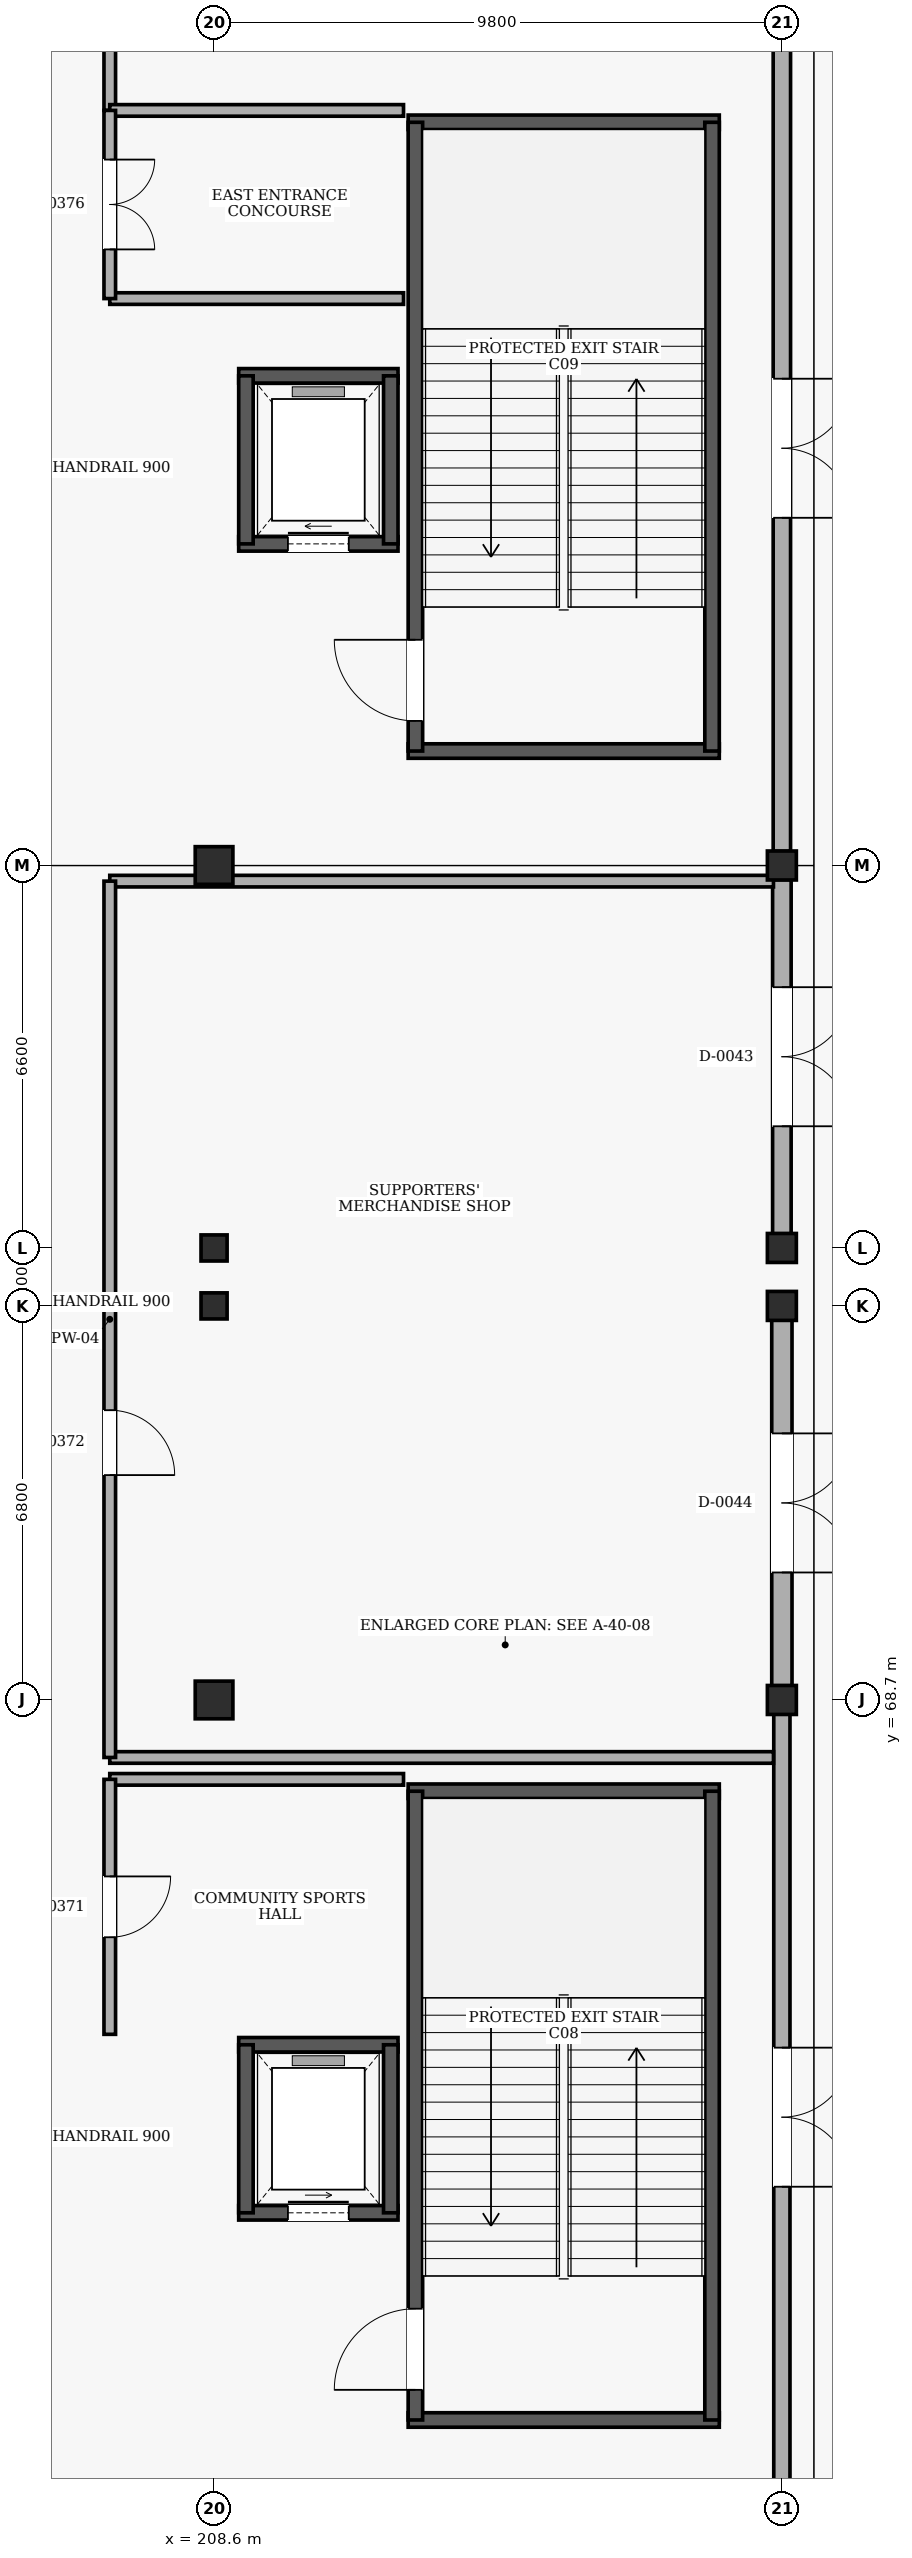
"""IFC4 building model, lengths in metres.
Left out: names, types, materials, properties, quantities, classifications, styles, units other than length and angle.
Written with IfcOpenShell. Run it as: python <this file> out.ifc"""

import sys

from ifc_helpers import new_model, si_unit, direction, frame, frame_2d, origin, origin_2d, place, context, subcontext, project, spatial, rectangle, extrude, element, fill, save


model = new_model("IFC4")
c1 = context("Model", 3, precision=1e-05, world=origin(), true_north=direction((0.0, 1.0)))
c2 = subcontext(c1, "Body", "Model", "MODEL_VIEW")
j1 = project(units=[si_unit("LENGTHUNIT", "METRE"), si_unit("PLANEANGLEUNIT", "RADIAN")], contexts=[c1])
p1 = place(None, origin())
s1 = spatial("IfcSite", under=j1, at=p1, CompositionType="ELEMENT")
p2 = place(p1, origin())
s2 = spatial("IfcBuilding", under=s1, at=p2, CompositionType="ELEMENT")
p3 = place(p2, origin())
s3 = spatial("IfcBuildingStorey", under=s2, at=p3, CompositionType="ELEMENT", Elevation=0.0)
p4 = place(p3, frame((208.6, 68.7, 0.0), z_axis=(0.0, 0.0, 1.0), x_axis=(1.0, 0.0, 0.0)))
e1 = element("IfcColumn", 1, at=p4, inside=s3, PredefinedType="COLUMN", context=c2, shape_type="SweptSolid", body=[
    extrude(rectangle(XDim=0.65, YDim=0.65, at=origin_2d()), origin(), (0.0, 0.0, 1.0), 5.4),
])
for number, where, z_axis, x_axis in (
    (2, (208.6, 75.5, 0.0), (0.0, 0.0, 1.0), (1.0, 0.0, 0.0)),
    (3, (208.6, 76.5, 0.0), (0.0, 0.0, 1.0), (1.0, 0.0, 0.0)),
):
    element("IfcColumn", number, at=place(p3, frame(where, z_axis=z_axis, x_axis=x_axis)), inside=s3, PredefinedType="COLUMN", context=c2, shape_type="SweptSolid", body=[
        extrude(rectangle(XDim=0.45, YDim=0.45, at=origin_2d()), origin(), (0.0, 0.0, 1.0), 5.4),
    ])
p5 = place(p3, frame((208.6, 83.1, 0.0), z_axis=(0.0, 0.0, 1.0), x_axis=(1.0, 0.0, 0.0)))
e4 = element("IfcColumn", 4, at=p5, inside=s3, PredefinedType="COLUMN", context=c2, shape_type="SweptSolid", body=[
    extrude(rectangle(XDim=0.65, YDim=0.65, at=origin_2d()), origin(), (0.0, 0.0, 1.0), 5.4),
])
for number, where, z_axis, x_axis in (
    (5, (218.4, 68.7, 0.0), (0.0, 0.0, 1.0), (1.0, 0.0, 0.0)),
    (6, (218.4, 75.5, 0.0), (0.0, 0.0, 1.0), (1.0, 0.0, 0.0)),
    (7, (218.4, 76.5, 0.0), (0.0, 0.0, 1.0), (1.0, 0.0, 0.0)),
    (8, (218.4, 83.1, 0.0), (0.0, 0.0, 1.0), (1.0, 0.0, 0.0)),
):
    element("IfcColumn", number, at=place(p3, frame(where, z_axis=z_axis, x_axis=x_axis)), inside=s3, PredefinedType="COLUMN", context=c2, shape_type="SweptSolid", body=[
        extrude(rectangle(XDim=0.5, YDim=0.5, at=origin_2d()), origin(), (0.0, 0.0, 1.0), 5.4),
    ])
p6 = place(p3, frame((218.4, 97.255, 0.0), z_axis=(0.0, 0.0, 1.0), x_axis=(0.0, -1.0, 0.0)))
e9 = element("IfcWall", 9, at=p6, inside=s3, PredefinedType="SOLIDWALL", context=c2, shape_type="SweptSolid", body=[
    extrude(rectangle(XDim=13.91, YDim=0.3, at=frame_2d((6.955, 0.0))), origin(), (0.0, 0.0, 1.0), 4.16),
])
p7 = place(p6, frame((5.755, 0.0, 0.0)))
e10 = element("IfcOpeningElement", 10, at=p7, cuts=e9, PredefinedType="OPENING", context=c2, shape_type="SweptSolid", body=[
    extrude(rectangle(XDim=2.4, YDim=2.2, at=frame_2d((1.2, 1.1))), frame((0.0, 0.16, 0.0), z_axis=(0.0, -1.0, 0.0), x_axis=(1.0, 0.0, 0.0)), (0.0, 0.0, 1.0), 0.32),
])
p8 = place(p3, frame((218.4, 82.855, 0.0), z_axis=(0.0, 0.0, 1.0), x_axis=(0.0, -1.0, 0.0)))
e11 = element("IfcWall", 11, at=p8, inside=s3, PredefinedType="SOLIDWALL", context=c2, shape_type="SweptSolid", body=[
    extrude(rectangle(XDim=6.11, YDim=0.32, at=frame_2d((3.055, 0.0))), origin(), (0.0, 0.0, 1.0), 4.56),
])
p9 = place(p8, frame((1.855, 0.0, 0.0)))
e12 = element("IfcOpeningElement", 12, at=p9, cuts=e11, PredefinedType="OPENING", context=c2, shape_type="SweptSolid", body=[
    extrude(rectangle(XDim=2.4, YDim=2.2, at=frame_2d((1.2, 1.1))), frame((0.0, 0.17, 0.0), z_axis=(0.0, -1.0, 0.0), x_axis=(1.0, 0.0, 0.0)), (0.0, 0.0, 1.0), 0.34),
])
p10 = place(p3, frame((218.4, 75.255, 0.0), z_axis=(0.0, 0.0, 1.0), x_axis=(0.0, -1.0, 0.0)))
e13 = element("IfcWall", 13, at=p10, inside=s3, PredefinedType="SOLIDWALL", context=c2, shape_type="SweptSolid", body=[
    extrude(rectangle(XDim=6.31, YDim=0.35, at=frame_2d((3.155, 0.0))), origin(), (0.0, 0.0, 1.0), 4.46),
])
p11 = place(p10, frame((1.955, 0.0, 0.0)))
e14 = element("IfcOpeningElement", 14, at=p11, cuts=e13, PredefinedType="OPENING", context=c2, shape_type="SweptSolid", body=[
    extrude(rectangle(XDim=2.4, YDim=2.2, at=frame_2d((1.2, 1.1))), frame((0.0, 0.185, 0.0), z_axis=(0.0, -1.0, 0.0), x_axis=(1.0, 0.0, 0.0)), (0.0, 0.0, 1.0), 0.37),
])
p12 = place(p3, frame((218.4, 68.455, 0.0), z_axis=(0.0, 0.0, 1.0), x_axis=(0.0, -1.0, 0.0)))
e15 = element("IfcWall", 15, at=p12, inside=s3, PredefinedType="SOLIDWALL", context=c2, shape_type="SweptSolid", body=[
    extrude(rectangle(XDim=13.91, YDim=0.28, at=frame_2d((6.955, 0.0))), origin(), (0.0, 0.0, 1.0), 4.16),
])
p13 = place(p12, frame((5.755, 0.0, 0.0)))
e16 = element("IfcOpeningElement", 16, at=p13, cuts=e15, PredefinedType="OPENING", context=c2, shape_type="SweptSolid", body=[
    extrude(rectangle(XDim=2.4, YDim=2.2, at=frame_2d((1.2, 1.1))), frame((0.0, 0.15, 0.0), z_axis=(0.0, -1.0, 0.0), x_axis=(1.0, 0.0, 0.0)), (0.0, 0.0, 1.0), 0.3),
])
for number, where, z_axis, x_axis in (
    (17, (211.95, 56.275, 0.0), (0.0, 0.0, 1.0), (1.0, 0.0, 0.0)),
    (18, (217.32, 67.125, 0.0), (0.0, 0.0, 1.0), (-1.0, 0.0, 0.0)),
):
    element("IfcWall", number, at=place(p3, frame(where, z_axis=z_axis, x_axis=x_axis)), inside=s3, PredefinedType="SHEAR", context=c2, shape_type="SweptSolid", body=[
        extrude(rectangle(XDim=5.37, YDim=0.25, at=frame_2d((2.685, 0.0))), origin(), (0.0, 0.0, 1.0), 5.08),
    ])
p14 = place(p3, frame((212.075, 56.275, 0.0), z_axis=(0.0, 0.0, 1.0), x_axis=(0.0, 1.0, 0.0)))
e19 = element("IfcWall", 19, at=p14, inside=s3, PredefinedType="SHEAR", context=c2, shape_type="SweptSolid", body=[
    extrude(rectangle(XDim=10.85, YDim=0.25, at=frame_2d((5.425, 0.0))), origin(), (0.0, 0.0, 1.0), 5.08),
])
p15 = place(p14, frame((0.52, 0.0, 0.0)))
e20 = element("IfcOpeningElement", 20, at=p15, cuts=e19, PredefinedType="OPENING", context=c2, shape_type="SweptSolid", body=[
    extrude(rectangle(XDim=1.4, YDim=2.15, at=frame_2d((0.7, 1.075))), frame((0.0, 0.135, 0.0), z_axis=(0.0, -1.0, 0.0), x_axis=(1.0, 0.0, 0.0)), (0.0, 0.0, 1.0), 0.27),
])
p16 = place(p3, frame((217.195, 56.275, 0.0), z_axis=(0.0, 0.0, 1.0), x_axis=(0.0, 1.0, 0.0)))
e21 = element("IfcWall", 21, at=p16, inside=s3, PredefinedType="SHEAR", context=c2, shape_type="SweptSolid", body=[
    extrude(rectangle(XDim=10.85, YDim=0.25, at=frame_2d((5.425, 0.0))), origin(), (0.0, 0.0, 1.0), 5.08),
])
for number, where, z_axis, x_axis in (
    (22, (211.95, 85.075, 0.0), (0.0, 0.0, 1.0), (1.0, 0.0, 0.0)),
    (23, (217.32, 95.925, 0.0), (0.0, 0.0, 1.0), (-1.0, 0.0, 0.0)),
):
    element("IfcWall", number, at=place(p3, frame(where, z_axis=z_axis, x_axis=x_axis)), inside=s3, PredefinedType="SHEAR", context=c2, shape_type="SweptSolid", body=[
        extrude(rectangle(XDim=5.37, YDim=0.25, at=frame_2d((2.685, 0.0))), origin(), (0.0, 0.0, 1.0), 5.08),
    ])
p17 = place(p3, frame((212.075, 85.075, 0.0), z_axis=(0.0, 0.0, 1.0), x_axis=(0.0, 1.0, 0.0)))
e24 = element("IfcWall", 24, at=p17, inside=s3, PredefinedType="SHEAR", context=c2, shape_type="SweptSolid", body=[
    extrude(rectangle(XDim=10.85, YDim=0.25, at=frame_2d((5.425, 0.0))), origin(), (0.0, 0.0, 1.0), 5.08),
])
p18 = place(p17, frame((0.52, 0.0, 0.0)))
e25 = element("IfcOpeningElement", 25, at=p18, cuts=e24, PredefinedType="OPENING", context=c2, shape_type="SweptSolid", body=[
    extrude(rectangle(XDim=1.4, YDim=2.15, at=frame_2d((0.7, 1.075))), frame((0.0, 0.135, 0.0), z_axis=(0.0, -1.0, 0.0), x_axis=(1.0, 0.0, 0.0)), (0.0, 0.0, 1.0), 0.27),
])
p19 = place(p3, frame((217.195, 85.075, 0.0), z_axis=(0.0, 0.0, 1.0), x_axis=(0.0, 1.0, 0.0)))
e26 = element("IfcWall", 26, at=p19, inside=s3, PredefinedType="SHEAR", context=c2, shape_type="SweptSolid", body=[
    extrude(rectangle(XDim=10.85, YDim=0.25, at=frame_2d((5.425, 0.0))), origin(), (0.0, 0.0, 1.0), 5.08),
])
p20 = place(p3, frame((209.025, 59.85, 0.0), z_axis=(0.0, 0.0, 1.0), x_axis=(1.0, 0.0, 0.0)))
e27 = element("IfcWall", 27, at=p20, inside=s3, PredefinedType="SHEAR", context=c2, shape_type="SweptSolid", body=[
    extrude(rectangle(XDim=2.75, YDim=0.25, at=frame_2d((1.375, 0.0))), origin(), (0.0, 0.0, 1.0), 5.08),
])
p21 = place(p20, frame((0.85, 0.0, 0.0)))
e28 = element("IfcOpeningElement", 28, at=p21, cuts=e27, PredefinedType="OPENING", context=c2, shape_type="SweptSolid", body=[
    extrude(rectangle(XDim=1.05, YDim=2.15, at=frame_2d((0.525, 1.075))), frame((0.0, 0.135, 0.0), z_axis=(0.0, -1.0, 0.0), x_axis=(1.0, 0.0, 0.0)), (0.0, 0.0, 1.0), 0.27),
])
p22 = place(p3, frame((211.775, 62.75, 0.0), z_axis=(0.0, 0.0, 1.0), x_axis=(-1.0, 0.0, 0.0)))
e29 = element("IfcWall", 29, at=p22, inside=s3, PredefinedType="SHEAR", context=c2, shape_type="SweptSolid", body=[
    extrude(rectangle(XDim=2.75, YDim=0.25, at=frame_2d((1.375, 0.0))), origin(), (0.0, 0.0, 1.0), 5.08),
])
for number, where, z_axis, x_axis in (
    (30, (209.15, 62.75, 0.0), (0.0, 0.0, 1.0), (0.0, -1.0, 0.0)),
    (31, (211.65, 59.85, 0.0), (0.0, 0.0, 1.0), (0.0, 1.0, 0.0)),
):
    element("IfcWall", number, at=place(p3, frame(where, z_axis=z_axis, x_axis=x_axis)), inside=s3, PredefinedType="SHEAR", context=c2, shape_type="SweptSolid", body=[
        extrude(rectangle(XDim=2.9, YDim=0.25, at=frame_2d((1.45, 0.0))), origin(), (0.0, 0.0, 1.0), 5.08),
    ])
p23 = place(p3, frame((209.025, 88.65, 0.0), z_axis=(0.0, 0.0, 1.0), x_axis=(1.0, 0.0, 0.0)))
e32 = element("IfcWall", 32, at=p23, inside=s3, PredefinedType="SHEAR", context=c2, shape_type="SweptSolid", body=[
    extrude(rectangle(XDim=2.75, YDim=0.25, at=frame_2d((1.375, 0.0))), origin(), (0.0, 0.0, 1.0), 5.08),
])
p24 = place(p23, frame((0.85, 0.0, 0.0)))
e33 = element("IfcOpeningElement", 33, at=p24, cuts=e32, PredefinedType="OPENING", context=c2, shape_type="SweptSolid", body=[
    extrude(rectangle(XDim=1.05, YDim=2.15, at=frame_2d((0.525, 1.075))), frame((0.0, 0.135, 0.0), z_axis=(0.0, -1.0, 0.0), x_axis=(1.0, 0.0, 0.0)), (0.0, 0.0, 1.0), 0.27),
])
p25 = place(p3, frame((211.775, 91.55, 0.0), z_axis=(0.0, 0.0, 1.0), x_axis=(-1.0, 0.0, 0.0)))
e34 = element("IfcWall", 34, at=p25, inside=s3, PredefinedType="SHEAR", context=c2, shape_type="SweptSolid", body=[
    extrude(rectangle(XDim=2.75, YDim=0.25, at=frame_2d((1.375, 0.0))), origin(), (0.0, 0.0, 1.0), 5.08),
])
for number, where, z_axis, x_axis in (
    (35, (209.15, 91.55, 0.0), (0.0, 0.0, 1.0), (0.0, -1.0, 0.0)),
    (36, (211.65, 88.65, 0.0), (0.0, 0.0, 1.0), (0.0, 1.0, 0.0)),
):
    element("IfcWall", number, at=place(p3, frame(where, z_axis=z_axis, x_axis=x_axis)), inside=s3, PredefinedType="SHEAR", context=c2, shape_type="SweptSolid", body=[
        extrude(rectangle(XDim=2.9, YDim=0.25, at=frame_2d((1.45, 0.0))), origin(), (0.0, 0.0, 1.0), 5.08),
    ])
p26 = place(p3, frame((211.87, 67.33, 0.0), z_axis=(0.0, 0.0, 1.0), x_axis=(-1.0, 0.0, 0.0)))
e37 = element("IfcWall", 37, at=p26, inside=s3, PredefinedType="PARTITIONING", context=c2, shape_type="SweptSolid", body=[
    extrude(rectangle(XDim=5.07, YDim=0.2, at=frame_2d((2.535, 0.0))), origin(), (0.0, 0.0, 1.0), 5.08),
])
p27 = place(p3, frame((206.8, 67.33, 0.0), z_axis=(0.0, 0.0, 1.0), x_axis=(0.0, -1.0, 0.0)))
e38 = element("IfcWall", 38, at=p27, inside=s3, PredefinedType="PARTITIONING", context=c2, shape_type="SweptSolid", body=[
    extrude(rectangle(XDim=4.4, YDim=0.2, at=frame_2d((2.2, 0.0))), origin(), (0.0, 0.0, 1.0), 5.08),
])
p28 = place(p27, frame((1.675, 0.0, 0.0)))
e39 = element("IfcOpeningElement", 39, at=p28, cuts=e38, PredefinedType="OPENING", context=c2, shape_type="SweptSolid", body=[
    extrude(rectangle(XDim=1.05, YDim=2.15, at=frame_2d((0.525, 1.075))), frame((0.0, 0.11, 0.0), z_axis=(0.0, -1.0, 0.0), x_axis=(1.0, 0.0, 0.0)), (0.0, 0.0, 1.0), 0.22),
])
p29 = place(p3, frame((206.8, 67.708, 0.0), z_axis=(0.0, 0.0, 1.0), x_axis=(1.0, 0.0, 0.0)))
e40 = element("IfcWall", 40, at=p29, inside=s3, PredefinedType="PARTITIONING", context=c2, shape_type="SweptSolid", body=[
    extrude(rectangle(XDim=11.455, YDim=0.2, at=frame_2d((5.728, 0.0))), origin(), (0.0, 0.0, 1.0), 5.08),
])
p30 = place(p3, frame((218.255, 82.83, 0.0), z_axis=(0.0, 0.0, 1.0), x_axis=(-1.0, 0.0, 0.0)))
e41 = element("IfcWall", 41, at=p30, inside=s3, PredefinedType="PARTITIONING", context=c2, shape_type="SweptSolid", body=[
    extrude(rectangle(XDim=11.455, YDim=0.2, at=frame_2d((5.728, 0.0))), origin(), (0.0, 0.0, 1.0), 4.21),
])
p31 = place(p3, frame((206.8, 82.83, 0.0), z_axis=(0.0, 0.0, 1.0), x_axis=(0.0, -1.0, 0.0)))
e42 = element("IfcWall", 42, at=p31, inside=s3, PredefinedType="PARTITIONING", context=c2, shape_type="SweptSolid", body=[
    extrude(rectangle(XDim=15.123, YDim=0.2, at=frame_2d((7.561, 0.0))), origin(), (0.0, 0.0, 1.0), 5.08),
])
p32 = place(p31, frame((9.13, 0.0, 0.0)))
e43 = element("IfcOpeningElement", 43, at=p32, cuts=e42, PredefinedType="OPENING", context=c2, shape_type="SweptSolid", body=[
    extrude(rectangle(XDim=1.12, YDim=2.15, at=frame_2d((0.56, 1.075))), frame((0.0, 0.11, 0.0), z_axis=(0.0, -1.0, 0.0), x_axis=(1.0, 0.0, 0.0)), (0.0, 0.0, 1.0), 0.22),
])
p33 = place(p3, frame((206.8, 101.817, 0.0), z_axis=(0.0, 0.0, 1.0), x_axis=(0.0, -1.0, 0.0)))
e44 = element("IfcWall", 44, at=p33, inside=s3, PredefinedType="PARTITIONING", context=c2, shape_type="SweptSolid", body=[
    extrude(rectangle(XDim=5.687, YDim=0.2, at=frame_2d((2.843, 0.0))), origin(), (0.0, 0.0, 1.0), 5.08),
])
p34 = place(p33, frame((2.143, 0.0, 0.0)))
e45 = element("IfcOpeningElement", 45, at=p34, cuts=e44, PredefinedType="OPENING", context=c2, shape_type="SweptSolid", body=[
    extrude(rectangle(XDim=1.4, YDim=2.2, at=frame_2d((0.7, 1.1))), frame((0.0, 0.11, 0.0), z_axis=(0.0, -1.0, 0.0), x_axis=(1.0, 0.0, 0.0)), (0.0, 0.0, 1.0), 0.22),
])
for number, where, z_axis, x_axis in (
    (46, (206.8, 92.883, 0.0), (0.0, 0.0, 1.0), (1.0, 0.0, 0.0)),
    (47, (211.87, 96.13, 0.0), (0.0, 0.0, 1.0), (-1.0, 0.0, 0.0)),
):
    element("IfcWall", number, at=place(p3, frame(where, z_axis=z_axis, x_axis=x_axis)), inside=s3, PredefinedType="PARTITIONING", context=c2, shape_type="SweptSolid", body=[
        extrude(rectangle(XDim=5.07, YDim=0.2, at=frame_2d((2.535, 0.0))), origin(), (0.0, 0.0, 1.0), 5.08),
    ])
p35 = place(p3, frame((206.8, 96.13, 0.0), z_axis=(0.0, 0.0, 1.0), x_axis=(0.0, -1.0, 0.0)))
e48 = element("IfcWall", 48, at=p35, inside=s3, PredefinedType="PARTITIONING", context=c2, shape_type="SweptSolid", body=[
    extrude(rectangle(XDim=3.247, YDim=0.2, at=frame_2d((1.623, 0.0))), origin(), (0.0, 0.0, 1.0), 5.08),
])
p36 = place(p35, frame((0.848, 0.0, 0.0)))
e49 = element("IfcOpeningElement", 49, at=p36, cuts=e48, PredefinedType="OPENING", context=c2, shape_type="SweptSolid", body=[
    extrude(rectangle(XDim=1.55, YDim=2.2, at=frame_2d((0.775, 1.1))), frame((0.0, 0.11, 0.0), z_axis=(0.0, -1.0, 0.0), x_axis=(1.0, 0.0, 0.0)), (0.0, 0.0, 1.0), 0.22),
])
p37 = place(p7, origin())
e50 = element("IfcDoor", 50, at=p37, inside=s3, OperationType="DOUBLE_DOOR_SINGLE_SWING", PredefinedType="DOOR", context=c2, shape_type="SweptSolid", body=[
    extrude(rectangle(XDim=2.4, YDim=2.2, at=frame_2d((1.2, 1.1))), frame((0.0, 0.025, 0.0), z_axis=(0.0, -1.0, 0.0), x_axis=(1.0, 0.0, 0.0)), (0.0, 0.0, 1.0), 0.05),
])
fill(e10, e50)
p38 = place(p9, origin())
e51 = element("IfcDoor", 51, at=p38, inside=s3, OperationType="DOUBLE_DOOR_SINGLE_SWING", PredefinedType="DOOR", context=c2, shape_type="SweptSolid", body=[
    extrude(rectangle(XDim=2.4, YDim=2.2, at=frame_2d((1.2, 1.1))), frame((0.0, 0.025, 0.0), z_axis=(0.0, -1.0, 0.0), x_axis=(1.0, 0.0, 0.0)), (0.0, 0.0, 1.0), 0.05),
])
fill(e12, e51)
p39 = place(p11, origin())
e52 = element("IfcDoor", 52, at=p39, inside=s3, OperationType="DOUBLE_DOOR_SINGLE_SWING", PredefinedType="DOOR", context=c2, shape_type="SweptSolid", body=[
    extrude(rectangle(XDim=2.4, YDim=2.2, at=frame_2d((1.2, 1.1))), frame((0.0, 0.025, 0.0), z_axis=(0.0, -1.0, 0.0), x_axis=(1.0, 0.0, 0.0)), (0.0, 0.0, 1.0), 0.05),
])
fill(e14, e52)
p40 = place(p13, origin())
e53 = element("IfcDoor", 53, at=p40, inside=s3, OperationType="DOUBLE_DOOR_SINGLE_SWING", PredefinedType="DOOR", context=c2, shape_type="SweptSolid", body=[
    extrude(rectangle(XDim=2.4, YDim=2.2, at=frame_2d((1.2, 1.1))), frame((0.0, 0.025, 0.0), z_axis=(0.0, -1.0, 0.0), x_axis=(1.0, 0.0, 0.0)), (0.0, 0.0, 1.0), 0.05),
])
fill(e16, e53)
p41 = place(p15, origin())
e54 = element("IfcDoor", 54, at=p41, inside=s3, OperationType="SINGLE_SWING_LEFT", PredefinedType="DOOR", context=c2, shape_type="SweptSolid", body=[
    extrude(rectangle(XDim=1.4, YDim=2.15, at=frame_2d((0.7, 1.075))), frame((0.0, 0.025, 0.0), z_axis=(0.0, -1.0, 0.0), x_axis=(1.0, 0.0, 0.0)), (0.0, 0.0, 1.0), 0.05),
])
fill(e20, e54)
p42 = place(p18, origin())
e55 = element("IfcDoor", 55, at=p42, inside=s3, OperationType="SINGLE_SWING_RIGHT", PredefinedType="DOOR", context=c2, shape_type="SweptSolid", body=[
    extrude(rectangle(XDim=1.4, YDim=2.15, at=frame_2d((0.7, 1.075))), frame((0.0, 0.025, 0.0), z_axis=(0.0, -1.0, 0.0), x_axis=(1.0, 0.0, 0.0)), (0.0, 0.0, 1.0), 0.05),
])
fill(e25, e55)
p43 = place(p21, origin())
e56 = element("IfcDoor", 56, at=p43, inside=s3, OperationType="SLIDING_TO_LEFT", PredefinedType="DOOR", context=c2, shape_type="SweptSolid", body=[
    extrude(rectangle(XDim=1.05, YDim=2.15, at=frame_2d((0.525, 1.075))), frame((0.0, 0.025, 0.0), z_axis=(0.0, -1.0, 0.0), x_axis=(1.0, 0.0, 0.0)), (0.0, 0.0, 1.0), 0.05),
])
fill(e28, e56)
p44 = place(p24, origin())
e57 = element("IfcDoor", 57, at=p44, inside=s3, OperationType="SLIDING_TO_RIGHT", PredefinedType="DOOR", context=c2, shape_type="SweptSolid", body=[
    extrude(rectangle(XDim=1.05, YDim=2.15, at=frame_2d((0.525, 1.075))), frame((0.0, 0.025, 0.0), z_axis=(0.0, -1.0, 0.0), x_axis=(1.0, 0.0, 0.0)), (0.0, 0.0, 1.0), 0.05),
])
fill(e33, e57)
p45 = place(p28, origin())
e58 = element("IfcDoor", 58, at=p45, inside=s3, OperationType="SINGLE_SWING_LEFT", PredefinedType="DOOR", context=c2, shape_type="SweptSolid", body=[
    extrude(rectangle(XDim=1.05, YDim=2.15, at=frame_2d((0.525, 1.075))), frame((0.0, 0.025, 0.0), z_axis=(0.0, -1.0, 0.0), x_axis=(1.0, 0.0, 0.0)), (0.0, 0.0, 1.0), 0.05),
])
fill(e39, e58)
p46 = place(p32, origin())
e59 = element("IfcDoor", 59, at=p46, inside=s3, OperationType="SINGLE_SWING_RIGHT", PredefinedType="DOOR", context=c2, shape_type="SweptSolid", body=[
    extrude(rectangle(XDim=1.12, YDim=2.15, at=frame_2d((0.56, 1.075))), frame((0.0, 0.025, 0.0), z_axis=(0.0, -1.0, 0.0), x_axis=(1.0, 0.0, 0.0)), (0.0, 0.0, 1.0), 0.05),
])
fill(e43, e59)
p47 = place(p36, origin())
e60 = element("IfcDoor", 60, at=p47, inside=s3, OperationType="DOUBLE_DOOR_SINGLE_SWING", PredefinedType="DOOR", context=c2, shape_type="SweptSolid", body=[
    extrude(rectangle(XDim=1.55, YDim=2.2, at=frame_2d((0.775, 1.1))), frame((0.0, 0.025, 0.0), z_axis=(0.0, -1.0, 0.0), x_axis=(1.0, 0.0, 0.0)), (0.0, 0.0, 1.0), 0.05),
])
fill(e49, e60)
save(model, sys.argv[1])
